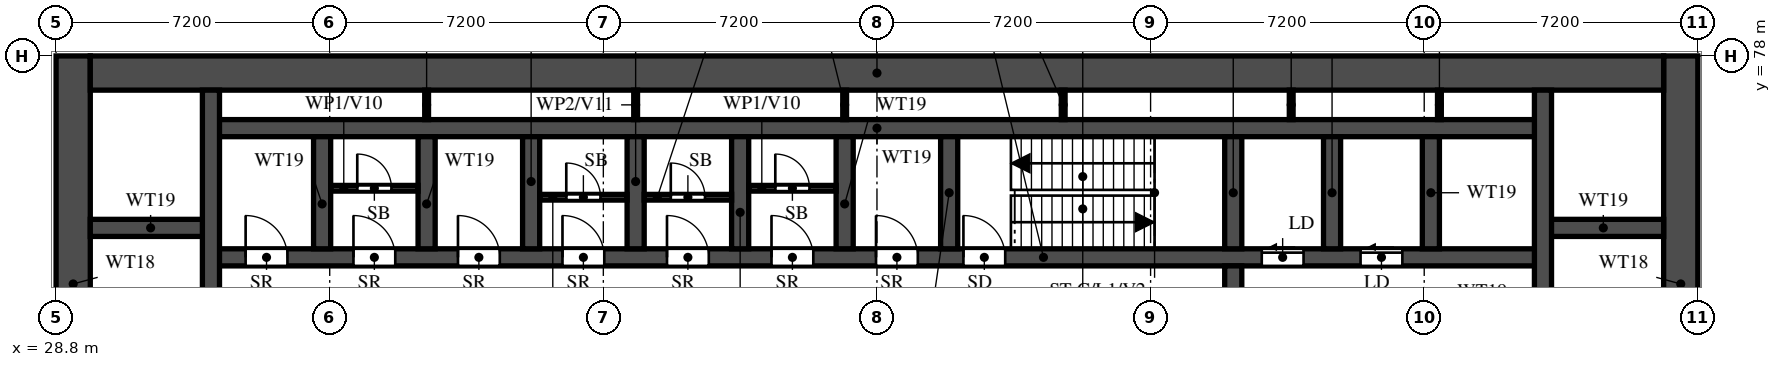
"""IFC4 building model, lengths in metres.
Left out: names, types, materials, properties, quantities, classifications, styles, units other than length and angle.
Written with IfcOpenShell. Run it as: python <this file> out.ifc"""

import sys

from ifc_helpers import new_model, si_unit, direction, frame, frame_2d, origin, place, context, subcontext, project, spatial, rectangle, extrude, element, fill, save


model = new_model("IFC4")
c1 = context("Model", 3, precision=1e-05, world=origin(), true_north=direction((0.0, 1.0)))
c2 = subcontext(c1, "Body", "Model", "MODEL_VIEW")
j1 = project(units=[si_unit("LENGTHUNIT", "METRE"), si_unit("PLANEANGLEUNIT", "RADIAN")], contexts=[c1])
p1 = place(None, origin())
s1 = spatial("IfcSite", under=j1, at=p1, CompositionType="ELEMENT")
p2 = place(p1, origin())
s2 = spatial("IfcBuilding", under=s1, at=p2, CompositionType="ELEMENT")
p3 = place(p2, frame((0.0, 0.0, 21.6)))
s3 = spatial("IfcBuildingStorey", under=s2, at=p3, CompositionType="ELEMENT", Elevation=21.6)
for number, where, z_axis, x_axis in (
    (1, (29.25, 66.0, 0.0), (0.0, 0.0, 1.0), (0.0, 1.0, 0.0)),
    (2, (71.55, 66.0, 0.0), (0.0, 0.0, 1.0), (0.0, 1.0, 0.0)),
):
    element("IfcWall", number, at=place(p3, frame(where, z_axis=z_axis, x_axis=x_axis)), inside=s3, PredefinedType="SHEAR", context=c2, shape_type="SweptSolid", body=[
        extrude(rectangle(XDim=12.0, YDim=0.9, at=frame_2d((6.0, 0.0))), origin(), (0.0, 0.0, 1.0), 4.95),
    ])
p4 = place(p3, frame((29.7, 77.55, 0.0), z_axis=(0.0, 0.0, 1.0), x_axis=(1.0, 0.0, 0.0)))
e3 = element("IfcWall", 3, at=p4, inside=s3, PredefinedType="SHEAR", context=c2, shape_type="SweptSolid", body=[
    extrude(rectangle(XDim=41.4, YDim=0.9, at=frame_2d((20.7, 0.0))), origin(), (0.0, 0.0, 1.0), 4.95),
])
p5 = place(p3, frame((32.875, 72.7, 0.0), z_axis=(0.0, 0.0, 1.0), x_axis=(1.0, 0.0, 0.0)))
e4 = element("IfcWall", 4, at=p5, inside=s3, PredefinedType="SHEAR", context=c2, shape_type="SweptSolid", body=[
    extrude(rectangle(XDim=35.05, YDim=0.45, at=frame_2d((17.525, 0.0))), origin(), (0.0, 0.0, 1.0), 4.95),
])
p6 = place(p5, frame((19.8, 0.0, 0.0)))
e5 = element("IfcOpeningElement", 5, at=p6, cuts=e4, PredefinedType="OPENING", context=c2, shape_type="SweptSolid", body=[
    extrude(rectangle(XDim=1.1, YDim=2.1, at=frame_2d((0.55, 1.05))), frame((0.0, 0.235, 0.0), z_axis=(0.0, -1.0, 0.0), x_axis=(1.0, 0.0, 0.0)), (0.0, 0.0, 1.0), 0.47),
])
p7 = place(p5, frame((27.65, 0.0, 0.0)))
e6 = element("IfcOpeningElement", 6, at=p7, cuts=e4, PredefinedType="OPENING", context=c2, shape_type="SweptSolid", body=[
    extrude(rectangle(XDim=1.1, YDim=2.1, at=frame_2d((0.55, 1.05))), frame((0.0, 0.235, 0.0), z_axis=(0.0, -1.0, 0.0), x_axis=(1.0, 0.0, 0.0)), (0.0, 0.0, 1.0), 0.47),
])
p8 = place(p5, frame((30.25, 0.0, 0.0)))
e7 = element("IfcOpeningElement", 7, at=p8, cuts=e4, PredefinedType="OPENING", context=c2, shape_type="SweptSolid", body=[
    extrude(rectangle(XDim=1.1, YDim=2.1, at=frame_2d((0.55, 1.05))), frame((0.0, 0.235, 0.0), z_axis=(0.0, -1.0, 0.0), x_axis=(1.0, 0.0, 0.0)), (0.0, 0.0, 1.0), 0.47),
])
p9 = place(p5, frame((3.75, 0.0, 0.0)))
e8 = element("IfcOpeningElement", 8, at=p9, cuts=e4, PredefinedType="OPENING", context=c2, shape_type="SweptSolid", body=[
    extrude(rectangle(XDim=1.1, YDim=2.1, at=frame_2d((0.55, 1.05))), frame((0.0, 0.235, 0.0), z_axis=(0.0, -1.0, 0.0), x_axis=(1.0, 0.0, 0.0)), (0.0, 0.0, 1.0), 0.47),
])
p10 = place(p5, frame((6.5, 0.0, 0.0)))
e9 = element("IfcOpeningElement", 9, at=p10, cuts=e4, PredefinedType="OPENING", context=c2, shape_type="SweptSolid", body=[
    extrude(rectangle(XDim=1.1, YDim=2.1, at=frame_2d((0.55, 1.05))), frame((0.0, 0.235, 0.0), z_axis=(0.0, -1.0, 0.0), x_axis=(1.0, 0.0, 0.0)), (0.0, 0.0, 1.0), 0.47),
])
p11 = place(p5, frame((9.25, 0.0, 0.0)))
e10 = element("IfcOpeningElement", 10, at=p11, cuts=e4, PredefinedType="OPENING", context=c2, shape_type="SweptSolid", body=[
    extrude(rectangle(XDim=1.1, YDim=2.1, at=frame_2d((0.55, 1.05))), frame((0.0, 0.235, 0.0), z_axis=(0.0, -1.0, 0.0), x_axis=(1.0, 0.0, 0.0)), (0.0, 0.0, 1.0), 0.47),
])
p12 = place(p5, frame((12.0, 0.0, 0.0)))
e11 = element("IfcOpeningElement", 11, at=p12, cuts=e4, PredefinedType="OPENING", context=c2, shape_type="SweptSolid", body=[
    extrude(rectangle(XDim=1.1, YDim=2.1, at=frame_2d((0.55, 1.05))), frame((0.0, 0.235, 0.0), z_axis=(0.0, -1.0, 0.0), x_axis=(1.0, 0.0, 0.0)), (0.0, 0.0, 1.0), 0.47),
])
p13 = place(p5, frame((14.75, 0.0, 0.0)))
e12 = element("IfcOpeningElement", 12, at=p13, cuts=e4, PredefinedType="OPENING", context=c2, shape_type="SweptSolid", body=[
    extrude(rectangle(XDim=1.1, YDim=2.1, at=frame_2d((0.55, 1.05))), frame((0.0, 0.235, 0.0), z_axis=(0.0, -1.0, 0.0), x_axis=(1.0, 0.0, 0.0)), (0.0, 0.0, 1.0), 0.47),
])
p14 = place(p5, frame((17.5, 0.0, 0.0)))
e13 = element("IfcOpeningElement", 13, at=p14, cuts=e4, PredefinedType="OPENING", context=c2, shape_type="SweptSolid", body=[
    extrude(rectangle(XDim=1.1, YDim=2.1, at=frame_2d((0.55, 1.05))), frame((0.0, 0.235, 0.0), z_axis=(0.0, -1.0, 0.0), x_axis=(1.0, 0.0, 0.0)), (0.0, 0.0, 1.0), 0.47),
])
p15 = place(p5, frame((0.913, 0.0, 0.0)))
e14 = element("IfcOpeningElement", 14, at=p15, cuts=e4, PredefinedType="OPENING", context=c2, shape_type="SweptSolid", body=[
    extrude(rectangle(XDim=1.1, YDim=2.1, at=frame_2d((0.55, 1.05))), frame((0.0, 0.235, 0.0), z_axis=(0.0, -1.0, 0.0), x_axis=(1.0, 0.0, 0.0)), (0.0, 0.0, 1.0), 0.47),
])
p16 = place(p3, frame((32.875, 76.1, 0.0), z_axis=(0.0, 0.0, 1.0), x_axis=(1.0, 0.0, 0.0)))
e15 = element("IfcWall", 15, at=p16, inside=s3, PredefinedType="SHEAR", context=c2, shape_type="SweptSolid", body=[
    extrude(rectangle(XDim=35.05, YDim=0.45, at=frame_2d((17.525, 0.0))), origin(), (0.0, 0.0, 1.0), 4.95),
])
for number, where, z_axis, x_axis in (
    (16, (29.7, 73.475, 0.0), (0.0, 0.0, 1.0), (1.0, 0.0, 0.0)),
    (17, (67.925, 73.475, 0.0), (0.0, 0.0, 1.0), (1.0, 0.0, 0.0)),
):
    element("IfcWall", number, at=place(p3, frame(where, z_axis=z_axis, x_axis=x_axis)), inside=s3, PredefinedType="SHEAR", context=c2, shape_type="SweptSolid", body=[
        extrude(rectangle(XDim=3.175, YDim=0.45, at=frame_2d((1.587, 0.0))), origin(), (0.0, 0.0, 1.0), 4.95),
    ])
p17 = place(p3, frame((32.875, 66.45, 0.0), z_axis=(0.0, 0.0, 1.0), x_axis=(0.0, 1.0, 0.0)))
e18 = element("IfcWall", 18, at=p17, inside=s3, PredefinedType="SHEAR", context=c2, shape_type="SweptSolid", body=[
    extrude(rectangle(XDim=10.65, YDim=0.45, at=frame_2d((5.325, 0.0))), origin(), (0.0, 0.0, 1.0), 4.95),
])
p18 = place(p3, frame((67.925, 66.45, 0.0), z_axis=(0.0, 0.0, 1.0), x_axis=(0.0, 1.0, 0.0)))
e19 = element("IfcWall", 19, at=p18, inside=s3, PredefinedType="SHEAR", context=c2, shape_type="SweptSolid", body=[
    extrude(rectangle(XDim=10.65, YDim=0.45, at=frame_2d((5.325, 0.0))), origin(), (0.0, 0.0, 1.0), 4.95),
])
p19 = place(p18, frame((0.15, 0.0, 0.0)))
e20 = element("IfcOpeningElement", 20, at=p19, cuts=e19, PredefinedType="OPENING", context=c2, shape_type="SweptSolid", body=[
    extrude(rectangle(XDim=1.1, YDim=2.1, at=frame_2d((0.55, 1.05))), frame((0.0, 0.235, 0.0), z_axis=(0.0, -1.0, 0.0), x_axis=(1.0, 0.0, 0.0)), (0.0, 0.0, 1.0), 0.47),
])
p20 = place(p3, frame((59.775, 66.45, 0.0), z_axis=(0.0, 0.0, 1.0), x_axis=(0.0, 1.0, 0.0)))
e21 = element("IfcWall", 21, at=p20, inside=s3, PredefinedType="SHEAR", context=c2, shape_type="SweptSolid", body=[
    extrude(rectangle(XDim=6.025, YDim=0.45, at=frame_2d((3.013, 0.0))), origin(), (0.0, 0.0, 1.0), 4.95),
])
p21 = place(p20, frame((3.85, 0.0, 0.0)))
e22 = element("IfcOpeningElement", 22, at=p21, cuts=e21, PredefinedType="OPENING", context=c2, shape_type="SweptSolid", body=[
    extrude(rectangle(XDim=1.2, YDim=2.1, at=frame_2d((0.6, 1.05))), frame((0.0, 0.235, 0.0), z_axis=(0.0, -1.0, 0.0), x_axis=(1.0, 0.0, 0.0)), (0.0, 0.0, 1.0), 0.47),
])
for number, where, z_axis, x_axis in (
    (23, (59.775, 72.925, 0.0), (0.0, 0.0, 1.0), (0.0, 1.0, 0.0)),
    (24, (35.8, 72.925, 0.0), (0.0, 0.0, 1.0), (0.0, 1.0, 0.0)),
    (25, (38.55, 72.925, 0.0), (0.0, 0.0, 1.0), (0.0, 1.0, 0.0)),
    (26, (41.3, 72.925, 0.0), (0.0, 0.0, 1.0), (0.0, 1.0, 0.0)),
    (27, (44.05, 72.925, 0.0), (0.0, 0.0, 1.0), (0.0, 1.0, 0.0)),
    (28, (46.8, 72.925, 0.0), (0.0, 0.0, 1.0), (0.0, 1.0, 0.0)),
    (29, (49.55, 72.925, 0.0), (0.0, 0.0, 1.0), (0.0, 1.0, 0.0)),
    (30, (52.3, 72.925, 0.0), (0.0, 0.0, 1.0), (0.0, 1.0, 0.0)),
    (31, (62.375, 72.925, 0.0), (0.0, 0.0, 1.0), (0.0, 1.0, 0.0)),
    (32, (64.975, 72.925, 0.0), (0.0, 0.0, 1.0), (0.0, 1.0, 0.0)),
):
    element("IfcWall", number, at=place(p3, frame(where, z_axis=z_axis, x_axis=x_axis)), inside=s3, PredefinedType="SHEAR", context=c2, shape_type="SweptSolid", body=[
        extrude(rectangle(XDim=2.95, YDim=0.45, at=frame_2d((1.475, 0.0))), origin(), (0.0, 0.0, 1.0), 4.95),
    ])
p22 = place(p3, frame((36.025, 74.518, 0.0), z_axis=(0.0, 0.0, 1.0), x_axis=(1.0, 0.0, 0.0)))
e33 = element("IfcWall", 33, at=p22, inside=s3, PredefinedType="PARTITIONING", context=c2, shape_type="SweptSolid", body=[
    extrude(rectangle(XDim=2.3, YDim=0.15, at=frame_2d((1.15, 0.0))), origin(), (0.0, 0.0, 1.0), 4.95),
])
p23 = place(p22, frame((0.7, 0.0, 0.0)))
e34 = element("IfcOpeningElement", 34, at=p23, cuts=e33, PredefinedType="OPENING", context=c2, shape_type="SweptSolid", body=[
    extrude(rectangle(XDim=0.9, YDim=2.1, at=frame_2d((0.45, 1.05))), frame((0.0, 0.085, 0.0), z_axis=(0.0, -1.0, 0.0), x_axis=(1.0, 0.0, 0.0)), (0.0, 0.0, 1.0), 0.17),
])
p24 = place(p3, frame((41.525, 74.282, 0.0), z_axis=(0.0, 0.0, 1.0), x_axis=(1.0, 0.0, 0.0)))
e35 = element("IfcWall", 35, at=p24, inside=s3, PredefinedType="PARTITIONING", context=c2, shape_type="SweptSolid", body=[
    extrude(rectangle(XDim=2.3, YDim=0.15, at=frame_2d((1.15, 0.0))), origin(), (0.0, 0.0, 1.0), 4.95),
])
p25 = place(p24, frame((0.7, 0.0, 0.0)))
e36 = element("IfcOpeningElement", 36, at=p25, cuts=e35, PredefinedType="OPENING", context=c2, shape_type="SweptSolid", body=[
    extrude(rectangle(XDim=0.9, YDim=2.1, at=frame_2d((0.45, 1.05))), frame((0.0, 0.085, 0.0), z_axis=(0.0, -1.0, 0.0), x_axis=(1.0, 0.0, 0.0)), (0.0, 0.0, 1.0), 0.17),
])
p26 = place(p3, frame((44.275, 74.282, 0.0), z_axis=(0.0, 0.0, 1.0), x_axis=(1.0, 0.0, 0.0)))
e37 = element("IfcWall", 37, at=p26, inside=s3, PredefinedType="PARTITIONING", context=c2, shape_type="SweptSolid", body=[
    extrude(rectangle(XDim=2.3, YDim=0.15, at=frame_2d((1.15, 0.0))), origin(), (0.0, 0.0, 1.0), 4.95),
])
p27 = place(p26, frame((0.7, 0.0, 0.0)))
e38 = element("IfcOpeningElement", 38, at=p27, cuts=e37, PredefinedType="OPENING", context=c2, shape_type="SweptSolid", body=[
    extrude(rectangle(XDim=0.9, YDim=2.1, at=frame_2d((0.45, 1.05))), frame((0.0, 0.085, 0.0), z_axis=(0.0, -1.0, 0.0), x_axis=(1.0, 0.0, 0.0)), (0.0, 0.0, 1.0), 0.17),
])
p28 = place(p3, frame((47.025, 74.518, 0.0), z_axis=(0.0, 0.0, 1.0), x_axis=(1.0, 0.0, 0.0)))
e39 = element("IfcWall", 39, at=p28, inside=s3, PredefinedType="PARTITIONING", context=c2, shape_type="SweptSolid", body=[
    extrude(rectangle(XDim=2.3, YDim=0.15, at=frame_2d((1.15, 0.0))), origin(), (0.0, 0.0, 1.0), 4.95),
])
p29 = place(p28, frame((0.7, 0.0, 0.0)))
e40 = element("IfcOpeningElement", 40, at=p29, cuts=e39, PredefinedType="OPENING", context=c2, shape_type="SweptSolid", body=[
    extrude(rectangle(XDim=0.9, YDim=2.1, at=frame_2d((0.45, 1.05))), frame((0.0, 0.085, 0.0), z_axis=(0.0, -1.0, 0.0), x_axis=(1.0, 0.0, 0.0)), (0.0, 0.0, 1.0), 0.17),
])
for number, where, z_axis, x_axis in (
    (41, (38.55, 76.325, 0.0), (0.0, 0.0, 1.0), (0.0, 1.0, 0.0)),
    (42, (44.05, 76.325, 0.0), (0.0, 0.0, 1.0), (0.0, 1.0, 0.0)),
    (43, (49.55, 76.325, 0.0), (0.0, 0.0, 1.0), (0.0, 1.0, 0.0)),
    (44, (55.3, 76.325, 0.0), (0.0, 0.0, 1.0), (0.0, 1.0, 0.0)),
    (45, (61.3, 76.325, 0.0), (0.0, 0.0, 1.0), (0.0, 1.0, 0.0)),
    (46, (65.2, 76.325, 0.0), (0.0, 0.0, 1.0), (0.0, 1.0, 0.0)),
):
    element("IfcWall", number, at=place(p3, frame(where, z_axis=z_axis, x_axis=x_axis)), inside=s3, PredefinedType="PARTITIONING", context=c2, shape_type="SweptSolid", body=[
        extrude(rectangle(XDim=0.775, YDim=0.1, at=frame_2d((0.388, 0.0))), origin(), (0.0, 0.0, 1.0), 4.95),
    ])
p30 = place(p6, origin())
e47 = element("IfcDoor", 47, at=p30, inside=s3, OperationType="SINGLE_SWING_LEFT", PredefinedType="DOOR", context=c2, shape_type="SweptSolid", body=[
    extrude(rectangle(XDim=1.1, YDim=2.1, at=frame_2d((0.55, 1.05))), frame((0.0, 0.025, 0.0), z_axis=(0.0, -1.0, 0.0), x_axis=(1.0, 0.0, 0.0)), (0.0, 0.0, 1.0), 0.05),
])
fill(e5, e47)
p31 = place(p7, origin())
e48 = element("IfcDoor", 48, at=p31, inside=s3, OperationType="SLIDING_TO_LEFT", PredefinedType="DOOR", context=c2, shape_type="SweptSolid", body=[
    extrude(rectangle(XDim=1.1, YDim=2.1, at=frame_2d((0.55, 1.05))), frame((0.0, 0.025, 0.0), z_axis=(0.0, -1.0, 0.0), x_axis=(1.0, 0.0, 0.0)), (0.0, 0.0, 1.0), 0.05),
])
fill(e6, e48)
p32 = place(p8, origin())
e49 = element("IfcDoor", 49, at=p32, inside=s3, OperationType="SLIDING_TO_LEFT", PredefinedType="DOOR", context=c2, shape_type="SweptSolid", body=[
    extrude(rectangle(XDim=1.1, YDim=2.1, at=frame_2d((0.55, 1.05))), frame((0.0, 0.025, 0.0), z_axis=(0.0, -1.0, 0.0), x_axis=(1.0, 0.0, 0.0)), (0.0, 0.0, 1.0), 0.05),
])
fill(e7, e49)
p33 = place(p9, origin())
e50 = element("IfcDoor", 50, at=p33, inside=s3, OperationType="SINGLE_SWING_LEFT", PredefinedType="DOOR", context=c2, shape_type="SweptSolid", body=[
    extrude(rectangle(XDim=1.1, YDim=2.1, at=frame_2d((0.55, 1.05))), frame((0.0, 0.025, 0.0), z_axis=(0.0, -1.0, 0.0), x_axis=(1.0, 0.0, 0.0)), (0.0, 0.0, 1.0), 0.05),
])
fill(e8, e50)
p34 = place(p23, origin())
e51 = element("IfcDoor", 51, at=p34, inside=s3, OperationType="SINGLE_SWING_RIGHT", PredefinedType="DOOR", context=c2, shape_type="SweptSolid", body=[
    extrude(rectangle(XDim=0.9, YDim=2.1, at=frame_2d((0.45, 1.05))), frame((0.0, 0.025, 0.0), z_axis=(0.0, -1.0, 0.0), x_axis=(1.0, 0.0, 0.0)), (0.0, 0.0, 1.0), 0.05),
])
fill(e34, e51)
p35 = place(p10, origin())
e52 = element("IfcDoor", 52, at=p35, inside=s3, OperationType="SINGLE_SWING_LEFT", PredefinedType="DOOR", context=c2, shape_type="SweptSolid", body=[
    extrude(rectangle(XDim=1.1, YDim=2.1, at=frame_2d((0.55, 1.05))), frame((0.0, 0.025, 0.0), z_axis=(0.0, -1.0, 0.0), x_axis=(1.0, 0.0, 0.0)), (0.0, 0.0, 1.0), 0.05),
])
fill(e9, e52)
p36 = place(p11, origin())
e53 = element("IfcDoor", 53, at=p36, inside=s3, OperationType="SINGLE_SWING_LEFT", PredefinedType="DOOR", context=c2, shape_type="SweptSolid", body=[
    extrude(rectangle(XDim=1.1, YDim=2.1, at=frame_2d((0.55, 1.05))), frame((0.0, 0.025, 0.0), z_axis=(0.0, -1.0, 0.0), x_axis=(1.0, 0.0, 0.0)), (0.0, 0.0, 1.0), 0.05),
])
fill(e10, e53)
p37 = place(p25, origin())
e54 = element("IfcDoor", 54, at=p37, inside=s3, OperationType="SINGLE_SWING_LEFT", PredefinedType="DOOR", context=c2, shape_type="SweptSolid", body=[
    extrude(rectangle(XDim=0.9, YDim=2.1, at=frame_2d((0.45, 1.05))), frame((0.0, 0.025, 0.0), z_axis=(0.0, -1.0, 0.0), x_axis=(1.0, 0.0, 0.0)), (0.0, 0.0, 1.0), 0.05),
])
fill(e36, e54)
p38 = place(p12, origin())
e55 = element("IfcDoor", 55, at=p38, inside=s3, OperationType="SINGLE_SWING_LEFT", PredefinedType="DOOR", context=c2, shape_type="SweptSolid", body=[
    extrude(rectangle(XDim=1.1, YDim=2.1, at=frame_2d((0.55, 1.05))), frame((0.0, 0.025, 0.0), z_axis=(0.0, -1.0, 0.0), x_axis=(1.0, 0.0, 0.0)), (0.0, 0.0, 1.0), 0.05),
])
fill(e11, e55)
p39 = place(p27, origin())
e56 = element("IfcDoor", 56, at=p39, inside=s3, OperationType="SINGLE_SWING_RIGHT", PredefinedType="DOOR", context=c2, shape_type="SweptSolid", body=[
    extrude(rectangle(XDim=0.9, YDim=2.1, at=frame_2d((0.45, 1.05))), frame((0.0, 0.025, 0.0), z_axis=(0.0, -1.0, 0.0), x_axis=(1.0, 0.0, 0.0)), (0.0, 0.0, 1.0), 0.05),
])
fill(e38, e56)
p40 = place(p13, origin())
e57 = element("IfcDoor", 57, at=p40, inside=s3, OperationType="SINGLE_SWING_LEFT", PredefinedType="DOOR", context=c2, shape_type="SweptSolid", body=[
    extrude(rectangle(XDim=1.1, YDim=2.1, at=frame_2d((0.55, 1.05))), frame((0.0, 0.025, 0.0), z_axis=(0.0, -1.0, 0.0), x_axis=(1.0, 0.0, 0.0)), (0.0, 0.0, 1.0), 0.05),
])
fill(e12, e57)
p41 = place(p29, origin())
e58 = element("IfcDoor", 58, at=p41, inside=s3, OperationType="SINGLE_SWING_RIGHT", PredefinedType="DOOR", context=c2, shape_type="SweptSolid", body=[
    extrude(rectangle(XDim=0.9, YDim=2.1, at=frame_2d((0.45, 1.05))), frame((0.0, 0.025, 0.0), z_axis=(0.0, -1.0, 0.0), x_axis=(1.0, 0.0, 0.0)), (0.0, 0.0, 1.0), 0.05),
])
fill(e40, e58)
p42 = place(p14, origin())
e59 = element("IfcDoor", 59, at=p42, inside=s3, OperationType="SINGLE_SWING_LEFT", PredefinedType="DOOR", context=c2, shape_type="SweptSolid", body=[
    extrude(rectangle(XDim=1.1, YDim=2.1, at=frame_2d((0.55, 1.05))), frame((0.0, 0.025, 0.0), z_axis=(0.0, -1.0, 0.0), x_axis=(1.0, 0.0, 0.0)), (0.0, 0.0, 1.0), 0.05),
])
fill(e13, e59)
p43 = place(p15, origin())
e60 = element("IfcDoor", 60, at=p43, inside=s3, OperationType="SINGLE_SWING_LEFT", PredefinedType="DOOR", context=c2, shape_type="SweptSolid", body=[
    extrude(rectangle(XDim=1.1, YDim=2.1, at=frame_2d((0.55, 1.05))), frame((0.0, 0.025, 0.0), z_axis=(0.0, -1.0, 0.0), x_axis=(1.0, 0.0, 0.0)), (0.0, 0.0, 1.0), 0.05),
])
fill(e14, e60)
save(model, sys.argv[1])
